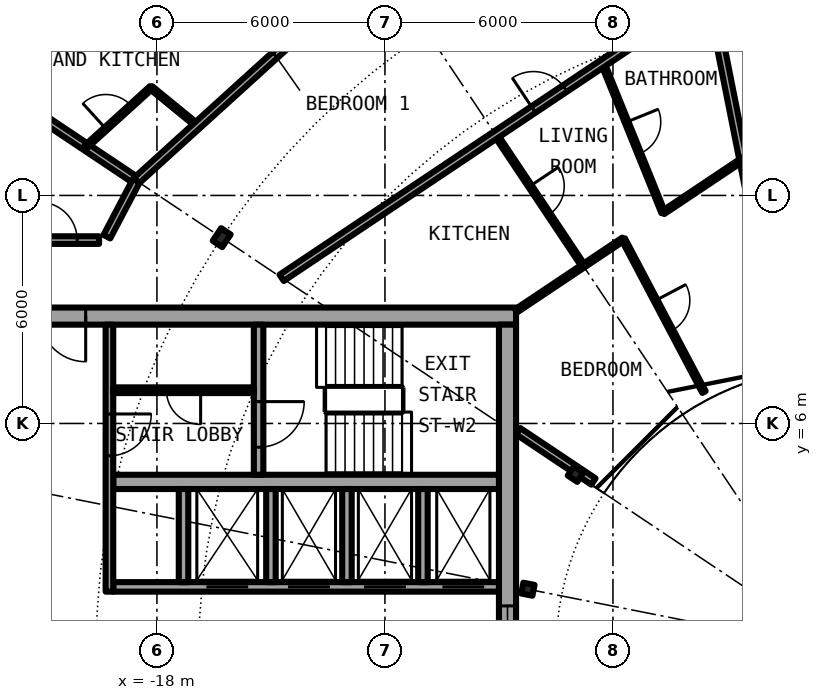
"""IFC4 building model, lengths in metres.
Left out: names, types, materials, properties, quantities, classifications, styles, units other than length and angle.
Written with IfcOpenShell. Run it as: python <this file> out.ifc"""

import sys

from ifc_helpers import new_model, si_unit, direction, frame, frame_2d, origin, origin_2d, place, context, subcontext, project, spatial, rectangle, i_section, extrude, element, fill, save


model = new_model("IFC4")
c1 = context("Model", 3, precision=1e-05, world=origin(), true_north=direction((0.0, 1.0)))
c2 = subcontext(c1, "Body", "Model", "MODEL_VIEW")
j1 = project(units=[si_unit("LENGTHUNIT", "METRE"), si_unit("PLANEANGLEUNIT", "RADIAN")], contexts=[c1])
p1 = place(None, origin())
s1 = spatial("IfcSite", under=j1, at=p1, CompositionType="ELEMENT")
p2 = place(p1, origin())
s2 = spatial("IfcBuilding", under=s1, at=p2, CompositionType="ELEMENT")
p3 = place(p2, frame((0.0, 0.0, 190.2)))
s3 = spatial("IfcBuildingStorey", under=s2, at=p3, CompositionType="ELEMENT", Elevation=190.2)
p4 = place(p3, frame((-16.297, 10.889, 0.0), z_axis=(0.0, 0.0, 1.0), x_axis=(-0.831469612303, 0.55557023302, 0.0)))
e1 = element("IfcColumn", 1, at=p4, inside=s3, PredefinedType="COLUMN", context=c2, shape_type="SweptSolid", body=[
    extrude(i_section(OverallWidth=0.3, OverallDepth=0.4, WebThickness=0.013, FlangeThickness=0.024, FilletRadius=0.027, at=origin_2d()), origin(), (0.0, 0.0, 1.0), 3.05),
])
for number, where, z_axis, x_axis in (
    (2, (-6.984, 4.667, 0.0), (0.0, 0.0, 1.0), (-0.831, 0.556, 0.0)),
    (3, (-8.239, 1.639, 0.0), (0.0, 0.0, 1.0), (-0.981, 0.195, 0.0)),
):
    element("IfcColumn", number, at=place(p3, frame(where, z_axis=z_axis, x_axis=x_axis)), inside=s3, PredefinedType="COLUMN", context=c2, shape_type="SweptSolid", body=[
        extrude(i_section(OverallWidth=0.3, OverallDepth=0.29, WebThickness=0.009, FlangeThickness=0.014, FilletRadius=0.027, at=origin_2d()), origin(), (0.0, 0.0, 1.0), 3.05),
    ])
p5 = place(p3, frame((-19.304, 19.304, 0.0), z_axis=(0.0, 0.0, 1.0), x_axis=(-0.634382322723, -0.773019449054, 0.0)))
e4 = element("IfcWall", 4, at=p5, inside=s3, PredefinedType="SOLIDWALL", context=c2, shape_type="SweptSolid", body=[
    extrude(rectangle(XDim=5.352, YDim=0.25, at=frame_2d((2.676, 0.0))), origin(), (0.0, 0.0, 1.0), 2.7),
])
p6 = place(p5, frame((0.841, 0.0, 0.0)))
e5 = element("IfcOpeningElement", 5, at=p6, cuts=e4, PredefinedType="OPENING", context=c2, shape_type="SweptSolid", body=[
    extrude(rectangle(XDim=1.0, YDim=2.2, at=frame_2d((0.5, 1.1))), frame((0.0, 0.135, 0.0), z_axis=(0.0, -1.0, 0.0), x_axis=(1.0, 0.0, 0.0)), (0.0, 0.0, 1.0), 0.27),
])
p7 = place(p5, frame((3.111, 0.0, 0.3)))
e6 = element("IfcOpeningElement", 6, at=p7, cuts=e4, PredefinedType="OPENING", context=c2, shape_type="SweptSolid", body=[
    extrude(rectangle(XDim=1.8, YDim=2.1, at=frame_2d((0.9, 1.05))), frame((0.0, 0.135, 0.0), z_axis=(0.0, -1.0, 0.0), x_axis=(1.0, 0.0, 0.0)), (0.0, 0.0, 1.0), 0.27),
])
p8 = place(p3, frame((-8.55, 8.825, 0.0), z_axis=(0.0, 0.0, 1.0), x_axis=(-1.0, 0.0, 0.0)))
e7 = element("IfcWall", 7, at=p8, inside=s3, PredefinedType="SHEAR", context=c2, shape_type="SweptSolid", body=[
    extrude(rectangle(XDim=13.5, YDim=0.45, at=frame_2d((6.75, 0.0))), origin(), (0.0, 0.0, 1.0), 3.05),
])
p9 = place(p8, frame((11.325, 0.0, 0.0)))
e8 = element("IfcOpeningElement", 8, at=p9, cuts=e7, PredefinedType="OPENING", context=c2, shape_type="SweptSolid", body=[
    extrude(rectangle(XDim=1.2, YDim=2.3, at=frame_2d((0.6, 1.15))), frame((0.0, 0.235, 0.0), z_axis=(0.0, -1.0, 0.0), x_axis=(1.0, 0.0, 0.0)), (0.0, 0.0, 1.0), 0.47),
])
p10 = place(p3, frame((-8.775, 8.6, 0.0), z_axis=(0.0, 0.0, 1.0), x_axis=(0.0, -1.0, 0.0)))
e9 = element("IfcWall", 9, at=p10, inside=s3, PredefinedType="SHEAR", context=c2, shape_type="SweptSolid", body=[
    extrude(rectangle(XDim=17.2, YDim=0.45, at=frame_2d((8.6, 0.0))), origin(), (0.0, 0.0, 1.0), 3.05),
])
p11 = place(p10, frame((7.4, 0.0, 0.1)))
e10 = element("IfcOpeningElement", 10, at=p11, cuts=e9, PredefinedType="OPENING", context=c2, shape_type="SweptSolid", body=[
    extrude(rectangle(XDim=2.4, YDim=2.2, at=frame_2d((1.2, 1.1))), frame((0.0, 0.235, 0.0), z_axis=(0.0, -1.0, 0.0), x_axis=(1.0, 0.0, 0.0)), (0.0, 0.0, 1.0), 0.47),
])
p12 = place(p3, frame((-9.0, 1.7, 0.0), z_axis=(0.0, 0.0, 1.0), x_axis=(-1.0, 0.0, 0.0)))
e11 = element("IfcWall", 11, at=p12, inside=s3, PredefinedType="SHEAR", context=c2, shape_type="SweptSolid", body=[
    extrude(rectangle(XDim=10.15, YDim=0.25, at=frame_2d((5.075, 0.0))), origin(), (0.0, 0.0, 1.0), 3.05),
])
p13 = place(p12, frame((0.387, 0.0, 0.0)))
e12 = element("IfcOpeningElement", 12, at=p13, cuts=e11, PredefinedType="OPENING", context=c2, shape_type="SweptSolid", body=[
    extrude(rectangle(XDim=1.1, YDim=2.3, at=frame_2d((0.55, 1.15))), frame((0.0, 0.135, 0.0), z_axis=(0.0, -1.0, 0.0), x_axis=(1.0, 0.0, 0.0)), (0.0, 0.0, 1.0), 0.27),
])
p14 = place(p12, frame((2.45, 0.0, 0.0)))
e13 = element("IfcOpeningElement", 13, at=p14, cuts=e11, PredefinedType="OPENING", context=c2, shape_type="SweptSolid", body=[
    extrude(rectangle(XDim=1.1, YDim=2.3, at=frame_2d((0.55, 1.15))), frame((0.0, 0.135, 0.0), z_axis=(0.0, -1.0, 0.0), x_axis=(1.0, 0.0, 0.0)), (0.0, 0.0, 1.0), 0.27),
])
p15 = place(p12, frame((4.45, 0.0, 0.0)))
e14 = element("IfcOpeningElement", 14, at=p15, cuts=e11, PredefinedType="OPENING", context=c2, shape_type="SweptSolid", body=[
    extrude(rectangle(XDim=1.1, YDim=2.3, at=frame_2d((0.55, 1.15))), frame((0.0, 0.135, 0.0), z_axis=(0.0, -1.0, 0.0), x_axis=(1.0, 0.0, 0.0)), (0.0, 0.0, 1.0), 0.27),
])
p16 = place(p12, frame((6.6, 0.0, 0.0)))
e15 = element("IfcOpeningElement", 15, at=p16, cuts=e11, PredefinedType="OPENING", context=c2, shape_type="SweptSolid", body=[
    extrude(rectangle(XDim=1.1, YDim=2.3, at=frame_2d((0.55, 1.15))), frame((0.0, 0.135, 0.0), z_axis=(0.0, -1.0, 0.0), x_axis=(1.0, 0.0, 0.0)), (0.0, 0.0, 1.0), 0.27),
])
p17 = place(p3, frame((-9.0, 4.462, 0.0), z_axis=(0.0, 0.0, 1.0), x_axis=(-1.0, 0.0, 0.0)))
e16 = element("IfcWall", 16, at=p17, inside=s3, PredefinedType="SHEAR", context=c2, shape_type="SweptSolid", body=[
    extrude(rectangle(XDim=10.15, YDim=0.375, at=frame_2d((5.075, 0.0))), origin(), (0.0, 0.0, 1.0), 3.05),
])
p18 = place(p3, frame((-15.325, 8.6, 0.0), z_axis=(0.0, 0.0, 1.0), x_axis=(0.0, -1.0, 0.0)))
e17 = element("IfcWall", 17, at=p18, inside=s3, PredefinedType="SHEAR", context=c2, shape_type="SweptSolid", body=[
    extrude(rectangle(XDim=3.95, YDim=0.25, at=frame_2d((1.975, 0.0))), origin(), (0.0, 0.0, 1.0), 3.05),
])
p19 = place(p18, frame((2.025, 0.0, 0.0)))
e18 = element("IfcOpeningElement", 18, at=p19, cuts=e17, PredefinedType="OPENING", context=c2, shape_type="SweptSolid", body=[
    extrude(rectangle(XDim=1.2, YDim=2.3, at=frame_2d((0.6, 1.15))), frame((0.0, 0.135, 0.0), z_axis=(0.0, -1.0, 0.0), x_axis=(1.0, 0.0, 0.0)), (0.0, 0.0, 1.0), 0.27),
])
for number, where, z_axis, x_axis in (
    (19, (-15.0, 1.825, 0.0), (0.0, 0.0, 1.0), (0.0, 1.0, 0.0)),
    (20, (-17.3, 1.825, 0.0), (0.0, 0.0, 1.0), (0.0, 1.0, 0.0)),
):
    element("IfcWall", number, at=place(p3, frame(where, z_axis=z_axis, x_axis=x_axis)), inside=s3, PredefinedType="SOLIDWALL", context=c2, shape_type="SweptSolid", body=[
        extrude(rectangle(XDim=2.45, YDim=0.25, at=frame_2d((1.225, 0.0))), origin(), (0.0, 0.0, 1.0), 2.7),
    ])
p20 = place(p3, frame((-19.25, 8.6, 0.0), z_axis=(0.0, 0.0, 1.0), x_axis=(0.0, -1.0, 0.0)))
e21 = element("IfcWall", 21, at=p20, inside=s3, PredefinedType="SOLIDWALL", context=c2, shape_type="SweptSolid", body=[
    extrude(rectangle(XDim=7.025, YDim=0.2, at=frame_2d((3.513, 0.0))), origin(), (0.0, 0.0, 1.0), 2.7),
])
p21 = place(p20, frame((2.35, 0.0, 0.0)))
e22 = element("IfcOpeningElement", 22, at=p21, cuts=e21, PredefinedType="OPENING", context=c2, shape_type="SweptSolid", body=[
    extrude(rectangle(XDim=1.1, YDim=2.3, at=frame_2d((0.55, 1.15))), frame((0.0, 0.11, 0.0), z_axis=(0.0, -1.0, 0.0), x_axis=(1.0, 0.0, 0.0)), (0.0, 0.0, 1.0), 0.22),
])
for number, where, z_axis, x_axis in (
    (23, (-11.0, 1.825, 0.0), (0.0, 0.0, 1.0), (0.0, 1.0, 0.0)),
    (24, (-13.0, 1.825, 0.0), (0.0, 0.0, 1.0), (0.0, 1.0, 0.0)),
):
    element("IfcWall", number, at=place(p3, frame(where, z_axis=z_axis, x_axis=x_axis)), inside=s3, PredefinedType="SOLIDWALL", context=c2, shape_type="SweptSolid", body=[
        extrude(rectangle(XDim=2.45, YDim=0.25, at=frame_2d((1.225, 0.0))), origin(), (0.0, 0.0, 1.0), 2.7),
    ])
p22 = place(p3, frame((-15.45, 6.875, 0.0), z_axis=(0.0, 0.0, 1.0), x_axis=(-1.0, 0.0, 0.0)))
e25 = element("IfcWall", 25, at=p22, inside=s3, PredefinedType="PARTITIONING", context=c2, shape_type="SweptSolid", body=[
    extrude(rectangle(XDim=3.7, YDim=0.15, at=frame_2d((1.85, 0.0))), origin(), (0.0, 0.0, 1.0), 2.7),
])
p23 = place(p22, frame((1.4, 0.0, 0.0)))
e26 = element("IfcOpeningElement", 26, at=p23, cuts=e25, PredefinedType="OPENING", context=c2, shape_type="SweptSolid", body=[
    extrude(rectangle(XDim=0.9, YDim=2.3, at=frame_2d((0.45, 1.15))), frame((0.0, 0.085, 0.0), z_axis=(0.0, -1.0, 0.0), x_axis=(1.0, 0.0, 0.0)), (0.0, 0.0, 1.0), 0.17),
])
p24 = place(p3, frame((-22.595, 15.098, 0.0), z_axis=(0.0, 0.0, 1.0), x_axis=(0.831387096605, -0.55569370664, 0.0)))
e27 = element("IfcWall", 27, at=p24, inside=s3, PredefinedType="PARTITIONING", context=c2, shape_type="SweptSolid", body=[
    extrude(rectangle(XDim=4.875, YDim=0.2, at=frame_2d((2.438, 0.0))), origin(), (0.0, 0.0, 1.0), 2.7),
])
p25 = place(p3, frame((-18.154, 14.834, 0.0), z_axis=(0.0, 0.0, 1.0), x_axis=(0.774345345452, -0.632763214779, 0.0)))
e28 = element("IfcWall", 28, at=p25, inside=s3, PredefinedType="PARTITIONING", context=c2, shape_type="SweptSolid", body=[
    extrude(rectangle(XDim=1.569, YDim=0.1, at=frame_2d((0.785, 0.0))), origin(), (0.0, 0.0, 1.0), 2.7),
])
p26 = place(p3, frame((-9.085, 13.597, 0.0), z_axis=(0.0, 0.0, 1.0), x_axis=(0.555528237031, -0.831497671591, 0.0)))
e29 = element("IfcWall", 29, at=p26, inside=s3, PredefinedType="PARTITIONING", context=c2, shape_type="SweptSolid", body=[
    extrude(rectangle(XDim=4.149, YDim=0.1, at=frame_2d((2.075, 0.0))), origin(), (0.0, 0.0, 1.0), 2.7),
])
p27 = place(p26, frame((1.625, 0.0, 0.0)))
e30 = element("IfcOpeningElement", 30, at=p27, cuts=e29, PredefinedType="OPENING", context=c2, shape_type="SweptSolid", body=[
    extrude(rectangle(XDim=0.9, YDim=2.3, at=frame_2d((0.45, 1.15))), frame((0.0, 0.06, 0.0), z_axis=(0.0, -1.0, 0.0), x_axis=(1.0, 0.0, 0.0)), (0.0, 0.0, 1.0), 0.12),
])
p28 = place(p3, frame((-6.269, 15.478, 0.0), z_axis=(0.0, 0.0, 1.0), x_axis=(0.375509828455, -0.926818411952, 0.0)))
e31 = element("IfcWall", 31, at=p28, inside=s3, PredefinedType="PARTITIONING", context=c2, shape_type="SweptSolid", body=[
    extrude(rectangle(XDim=4.237, YDim=0.1, at=frame_2d((2.119, 0.0))), origin(), (0.0, 0.0, 1.0), 2.7),
])
p29 = place(p28, frame((1.669, 0.0, 0.0)))
e32 = element("IfcOpeningElement", 32, at=p29, cuts=e31, PredefinedType="OPENING", context=c2, shape_type="SweptSolid", body=[
    extrude(rectangle(XDim=0.9, YDim=2.3, at=frame_2d((0.45, 1.15))), frame((0.0, 0.06, 0.0), z_axis=(0.0, -1.0, 0.0), x_axis=(1.0, 0.0, 0.0)), (0.0, 0.0, 1.0), 0.12),
])
p30 = place(p3, frame((-5.729, 10.849, 0.0), z_axis=(0.0, 0.0, 1.0), x_axis=(0.466962677975, -0.884277025246, 0.0)))
e33 = element("IfcWall", 33, at=p30, inside=s3, PredefinedType="PARTITIONING", context=c2, shape_type="SweptSolid", body=[
    extrude(rectangle(XDim=4.549, YDim=0.1, at=frame_2d((2.274, 0.0))), origin(), (0.0, 0.0, 1.0), 2.7),
])
p31 = place(p30, frame((1.824, 0.0, 0.0)))
e34 = element("IfcOpeningElement", 34, at=p31, cuts=e33, PredefinedType="OPENING", context=c2, shape_type="SweptSolid", body=[
    extrude(rectangle(XDim=0.9, YDim=2.3, at=frame_2d((0.45, 1.15))), frame((0.0, 0.06, 0.0), z_axis=(0.0, -1.0, 0.0), x_axis=(1.0, 0.0, 0.0)), (0.0, 0.0, 1.0), 0.12),
])
p32 = place(p3, frame((-3.453, 17.36, 0.0), z_axis=(0.0, 0.0, 1.0), x_axis=(0.195074954737, -0.98078833702, 0.0)))
e35 = element("IfcWall", 35, at=p32, inside=s3, PredefinedType="PARTITIONING", context=c2, shape_type="SweptSolid", body=[
    extrude(rectangle(XDim=9.155, YDim=0.2, at=frame_2d((4.577, 0.0))), origin(), (0.0, 0.0, 1.0), 2.7),
])
p33 = place(p3, frame((-6.513, 4.472, 0.0), z_axis=(0.0, 0.0, 1.0), x_axis=(-0.831403409976, 0.555669299026, 0.0)))
e36 = element("IfcWall", 36, at=p33, inside=s3, PredefinedType="PARTITIONING", context=c2, shape_type="SweptSolid", body=[
    extrude(rectangle(XDim=2.383, YDim=0.2, at=frame_2d((1.191, 0.0))), origin(), (0.0, 0.0, 1.0), 2.7),
])
p34 = place(p3, frame((-21.675, 10.825, 0.0), z_axis=(0.0, 0.0, 1.0), x_axis=(1.0, 0.0, 0.0)))
e37 = element("IfcWall", 37, at=p34, inside=s3, PredefinedType="PARTITIONING", context=c2, shape_type="SweptSolid", body=[
    extrude(rectangle(XDim=2.152, YDim=0.2, at=frame_2d((1.076, 0.0))), origin(), (0.0, 0.0, 1.0), 2.7),
])
p35 = place(p34, frame((0.576, 0.0, 0.0)))
e38 = element("IfcOpeningElement", 38, at=p35, cuts=e37, PredefinedType="OPENING", context=c2, shape_type="SweptSolid", body=[
    extrude(rectangle(XDim=1.0, YDim=2.3, at=frame_2d((0.5, 1.15))), frame((0.0, 0.11, 0.0), z_axis=(0.0, -1.0, 0.0), x_axis=(1.0, 0.0, 0.0)), (0.0, 0.0, 1.0), 0.22),
])
p36 = place(p3, frame((-8.55, 8.963, 0.0), z_axis=(0.0, 0.0, 1.0), x_axis=(0.83129689803, 0.555828631257, 0.0)))
e39 = element("IfcWall", 39, at=p36, inside=s3, PredefinedType="PARTITIONING", context=c2, shape_type="SweptSolid", body=[
    extrude(rectangle(XDim=3.394, YDim=0.1, at=frame_2d((1.697, 0.0))), origin(), (0.0, 0.0, 1.0), 2.7),
])
p37 = place(p3, frame((-4.678, 11.551, 0.0), z_axis=(0.0, 0.0, 1.0), x_axis=(0.831440395268, 0.555613956912, 0.0)))
e40 = element("IfcWall", 40, at=p37, inside=s3, PredefinedType="PARTITIONING", context=c2, shape_type="SweptSolid", body=[
    extrude(rectangle(XDim=2.527, YDim=0.1, at=frame_2d((1.264, 0.0))), origin(), (0.0, 0.0, 1.0), 2.7),
])
p38 = place(p3, frame((-14.718, 9.832, 0.0), z_axis=(0.0, 0.0, 1.0), x_axis=(0.831437137577, 0.555618831806, 0.0)))
e41 = element("IfcWall", 41, at=p38, inside=s3, PredefinedType="PARTITIONING", context=c2, shape_type="SweptSolid", body=[
    extrude(rectangle(XDim=13.549, YDim=0.2, at=frame_2d((6.774, 0.0))), origin(), (0.0, 0.0, 1.0), 2.7),
])
p39 = place(p38, frame((7.968, 0.0, 0.0)))
e42 = element("IfcOpeningElement", 42, at=p39, cuts=e41, PredefinedType="OPENING", context=c2, shape_type="SweptSolid", body=[
    extrude(rectangle(XDim=1.0, YDim=2.3, at=frame_2d((0.5, 1.15))), frame((0.0, 0.11, 0.0), z_axis=(0.0, -1.0, 0.0), x_axis=(1.0, 0.0, 0.0)), (0.0, 0.0, 1.0), 0.22),
])
p40 = place(p3, frame((-18.543, 12.386, 0.0), z_axis=(0.0, 0.0, 1.0), x_axis=(0.740853508928, 0.671666642248, 0.0)))
e43 = element("IfcWall", 43, at=p40, inside=s3, PredefinedType="PARTITIONING", context=c2, shape_type="SweptSolid", body=[
    extrude(rectangle(XDim=10.84, YDim=0.2, at=frame_2d((5.42, 0.0))), origin(), (0.0, 0.0, 1.0), 2.7),
])
p41 = place(p40, frame((4.921, 0.0, 0.0)))
e44 = element("IfcOpeningElement", 44, at=p41, cuts=e43, PredefinedType="OPENING", context=c2, shape_type="SweptSolid", body=[
    extrude(rectangle(XDim=1.0, YDim=2.3, at=frame_2d((0.5, 1.15))), frame((0.0, 0.11, 0.0), z_axis=(0.0, -1.0, 0.0), x_axis=(1.0, 0.0, 0.0)), (0.0, 0.0, 1.0), 0.22),
])
p42 = place(p3, frame((-19.317, 10.915, 0.0), z_axis=(0.0, 0.0, 1.0), x_axis=(0.465359652486, 0.885121683068, 0.0)))
e45 = element("IfcWall", 45, at=p42, inside=s3, PredefinedType="PARTITIONING", context=c2, shape_type="SweptSolid", body=[
    extrude(rectangle(XDim=1.665, YDim=0.2, at=frame_2d((0.833, 0.0))), origin(), (0.0, 0.0, 1.0), 2.7),
])
p43 = place(p3, frame((-19.872, 13.278, 0.0), z_axis=(0.0, 0.0, 1.0), x_axis=(0.740990220108, 0.671515817911, 0.0)))
e46 = element("IfcWall", 46, at=p43, inside=s3, PredefinedType="PARTITIONING", context=c2, shape_type="SweptSolid", body=[
    extrude(rectangle(XDim=2.323, YDim=0.1, at=frame_2d((1.161, 0.0))), origin(), (0.0, 0.0, 1.0), 2.7),
])
p44 = place(p43, frame((0.711, 0.0, 0.0)))
e47 = element("IfcOpeningElement", 47, at=p44, cuts=e46, PredefinedType="OPENING", context=c2, shape_type="SweptSolid", body=[
    extrude(rectangle(XDim=0.9, YDim=2.3, at=frame_2d((0.45, 1.15))), frame((0.0, 0.06, 0.0), z_axis=(0.0, -1.0, 0.0), x_axis=(1.0, 0.0, 0.0)), (0.0, 0.0, 1.0), 0.12),
])
p45 = place(p13, origin())
e48 = element("IfcDoor", 48, at=p45, inside=s3, OperationType="DOUBLE_DOOR_SLIDING", PredefinedType="DOOR", context=c2, shape_type="SweptSolid", body=[
    extrude(rectangle(XDim=1.1, YDim=2.3, at=frame_2d((0.55, 1.15))), frame((0.0, 0.025, 0.0), z_axis=(0.0, -1.0, 0.0), x_axis=(1.0, 0.0, 0.0)), (0.0, 0.0, 1.0), 0.05),
])
fill(e12, e48)
p46 = place(p14, origin())
e49 = element("IfcDoor", 49, at=p46, inside=s3, OperationType="DOUBLE_DOOR_SLIDING", PredefinedType="DOOR", context=c2, shape_type="SweptSolid", body=[
    extrude(rectangle(XDim=1.1, YDim=2.3, at=frame_2d((0.55, 1.15))), frame((0.0, 0.025, 0.0), z_axis=(0.0, -1.0, 0.0), x_axis=(1.0, 0.0, 0.0)), (0.0, 0.0, 1.0), 0.05),
])
fill(e13, e49)
p47 = place(p15, origin())
e50 = element("IfcDoor", 50, at=p47, inside=s3, OperationType="DOUBLE_DOOR_SLIDING", PredefinedType="DOOR", context=c2, shape_type="SweptSolid", body=[
    extrude(rectangle(XDim=1.1, YDim=2.3, at=frame_2d((0.55, 1.15))), frame((0.0, 0.025, 0.0), z_axis=(0.0, -1.0, 0.0), x_axis=(1.0, 0.0, 0.0)), (0.0, 0.0, 1.0), 0.05),
])
fill(e14, e50)
p48 = place(p16, origin())
e51 = element("IfcDoor", 51, at=p48, inside=s3, OperationType="DOUBLE_DOOR_SLIDING", PredefinedType="DOOR", context=c2, shape_type="SweptSolid", body=[
    extrude(rectangle(XDim=1.1, YDim=2.3, at=frame_2d((0.55, 1.15))), frame((0.0, 0.025, 0.0), z_axis=(0.0, -1.0, 0.0), x_axis=(1.0, 0.0, 0.0)), (0.0, 0.0, 1.0), 0.05),
])
fill(e15, e51)
p49 = place(p23, origin())
e52 = element("IfcDoor", 52, at=p49, inside=s3, OperationType="SINGLE_SWING_LEFT", PredefinedType="DOOR", context=c2, shape_type="SweptSolid", body=[
    extrude(rectangle(XDim=0.9, YDim=2.3, at=frame_2d((0.45, 1.15))), frame((0.0, 0.025, 0.0), z_axis=(0.0, -1.0, 0.0), x_axis=(1.0, 0.0, 0.0)), (0.0, 0.0, 1.0), 0.05),
])
fill(e26, e52)
p50 = place(p19, origin())
e53 = element("IfcDoor", 53, at=p50, inside=s3, OperationType="SINGLE_SWING_LEFT", PredefinedType="DOOR", context=c2, shape_type="SweptSolid", body=[
    extrude(rectangle(XDim=1.2, YDim=2.3, at=frame_2d((0.6, 1.15))), frame((0.0, 0.025, 0.0), z_axis=(0.0, -1.0, 0.0), x_axis=(1.0, 0.0, 0.0)), (0.0, 0.0, 1.0), 0.05),
])
fill(e18, e53)
p51 = place(p21, origin())
e54 = element("IfcDoor", 54, at=p51, inside=s3, OperationType="SINGLE_SWING_RIGHT", PredefinedType="DOOR", context=c2, shape_type="SweptSolid", body=[
    extrude(rectangle(XDim=1.1, YDim=2.3, at=frame_2d((0.55, 1.15))), frame((0.0, 0.025, 0.0), z_axis=(0.0, -1.0, 0.0), x_axis=(1.0, 0.0, 0.0)), (0.0, 0.0, 1.0), 0.05),
])
fill(e22, e54)
p52 = place(p9, origin())
e55 = element("IfcDoor", 55, at=p52, inside=s3, OperationType="SINGLE_SWING_LEFT", PredefinedType="DOOR", context=c2, shape_type="SweptSolid", body=[
    extrude(rectangle(XDim=1.2, YDim=2.3, at=frame_2d((0.6, 1.15))), frame((0.0, 0.025, 0.0), z_axis=(0.0, -1.0, 0.0), x_axis=(1.0, 0.0, 0.0)), (0.0, 0.0, 1.0), 0.05),
])
fill(e8, e55)
p53 = place(p11, origin())
e56 = element("IfcWindow", 56, at=p53, inside=s3, PartitioningType="SINGLE_PANEL", PredefinedType="WINDOW", context=c2, shape_type="SweptSolid", body=[
    extrude(rectangle(XDim=2.4, YDim=2.2, at=frame_2d((1.2, 1.1))), frame((0.0, 0.03, 0.0), z_axis=(0.0, -1.0, 0.0), x_axis=(1.0, 0.0, 0.0)), (0.0, 0.0, 1.0), 0.06),
])
fill(e10, e56)
p54 = place(p41, origin())
e57 = element("IfcDoor", 57, at=p54, inside=s3, OperationType="SINGLE_SWING_RIGHT", PredefinedType="DOOR", context=c2, shape_type="SweptSolid", body=[
    extrude(rectangle(XDim=1.0, YDim=2.3, at=frame_2d((0.5, 1.15))), frame((0.0, 0.025, 0.0), z_axis=(0.0, -1.0, 0.0), x_axis=(1.0, 0.0, 0.0)), (0.0, 0.0, 1.0), 0.05),
])
fill(e44, e57)
p55 = place(p44, origin())
e58 = element("IfcDoor", 58, at=p55, inside=s3, OperationType="SINGLE_SWING_LEFT", PredefinedType="DOOR", context=c2, shape_type="SweptSolid", body=[
    extrude(rectangle(XDim=0.9, YDim=2.3, at=frame_2d((0.45, 1.15))), frame((0.0, 0.025, 0.0), z_axis=(0.0, -1.0, 0.0), x_axis=(1.0, 0.0, 0.0)), (0.0, 0.0, 1.0), 0.05),
])
fill(e47, e58)
p56 = place(p39, origin())
e59 = element("IfcDoor", 59, at=p56, inside=s3, OperationType="SINGLE_SWING_RIGHT", PredefinedType="DOOR", context=c2, shape_type="SweptSolid", body=[
    extrude(rectangle(XDim=1.0, YDim=2.3, at=frame_2d((0.5, 1.15))), frame((0.0, 0.025, 0.0), z_axis=(0.0, -1.0, 0.0), x_axis=(1.0, 0.0, 0.0)), (0.0, 0.0, 1.0), 0.05),
])
fill(e42, e59)
p57 = place(p29, origin())
e60 = element("IfcDoor", 60, at=p57, inside=s3, OperationType="SINGLE_SWING_LEFT", PredefinedType="DOOR", context=c2, shape_type="SweptSolid", body=[
    extrude(rectangle(XDim=0.9, YDim=2.3, at=frame_2d((0.45, 1.15))), frame((0.0, 0.025, 0.0), z_axis=(0.0, -1.0, 0.0), x_axis=(1.0, 0.0, 0.0)), (0.0, 0.0, 1.0), 0.05),
])
fill(e32, e60)
p58 = place(p27, origin())
e61 = element("IfcDoor", 61, at=p58, inside=s3, OperationType="SINGLE_SWING_LEFT", PredefinedType="DOOR", context=c2, shape_type="SweptSolid", body=[
    extrude(rectangle(XDim=0.9, YDim=2.3, at=frame_2d((0.45, 1.15))), frame((0.0, 0.025, 0.0), z_axis=(0.0, -1.0, 0.0), x_axis=(1.0, 0.0, 0.0)), (0.0, 0.0, 1.0), 0.05),
])
fill(e30, e61)
p59 = place(p31, origin())
e62 = element("IfcDoor", 62, at=p59, inside=s3, OperationType="SINGLE_SWING_RIGHT", PredefinedType="DOOR", context=c2, shape_type="SweptSolid", body=[
    extrude(rectangle(XDim=0.9, YDim=2.3, at=frame_2d((0.45, 1.15))), frame((0.0, 0.025, 0.0), z_axis=(0.0, -1.0, 0.0), x_axis=(1.0, 0.0, 0.0)), (0.0, 0.0, 1.0), 0.05),
])
fill(e34, e62)
p60 = place(p35, origin())
e63 = element("IfcDoor", 63, at=p60, inside=s3, OperationType="SINGLE_SWING_LEFT", PredefinedType="DOOR", context=c2, shape_type="SweptSolid", body=[
    extrude(rectangle(XDim=1.0, YDim=2.3, at=frame_2d((0.5, 1.15))), frame((0.0, 0.025, 0.0), z_axis=(0.0, -1.0, 0.0), x_axis=(1.0, 0.0, 0.0)), (0.0, 0.0, 1.0), 0.05),
])
fill(e38, e63)
save(model, sys.argv[1])
